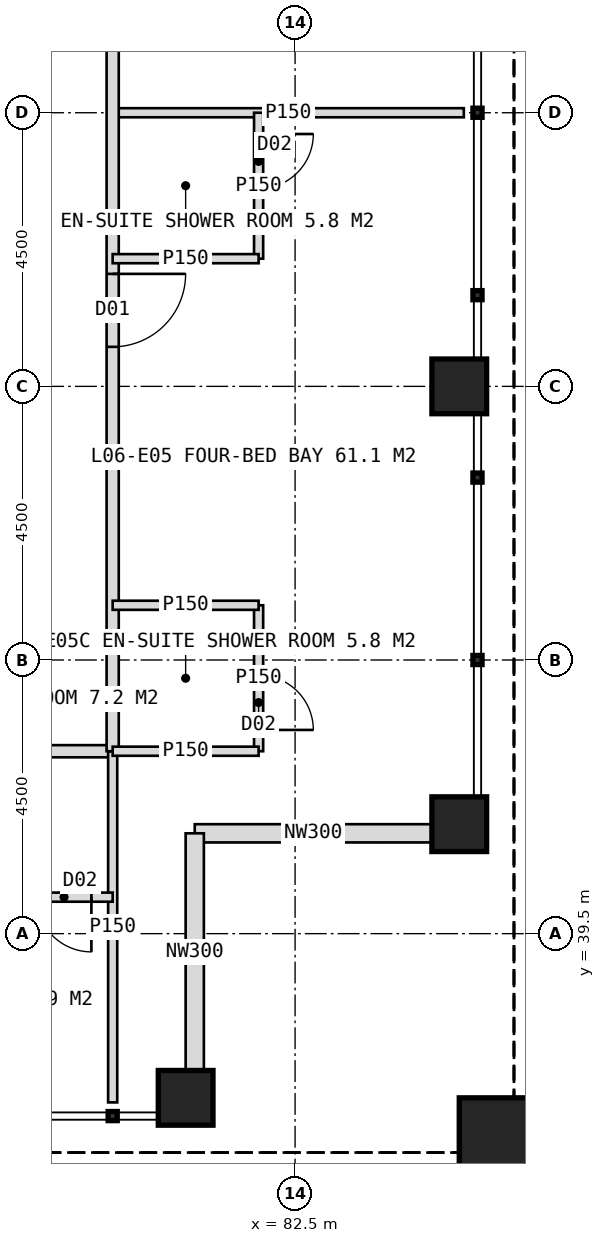
"""IFC4 building model, lengths in metres.
Left out: names, types, materials, properties, quantities, classifications, styles, units other than length and angle.
Written with IfcOpenShell. Run it as: python <this file> out.ifc"""

import sys

from ifc_helpers import new_model, si_unit, direction, frame, frame_2d, origin, origin_2d, place, context, subcontext, project, spatial, rectangle, hollow_rectangle, extrude, element, fill, save


model = new_model("IFC4")
c1 = context("Model", 3, precision=1e-05, world=origin(), true_north=direction((0.0, 1.0)))
c2 = subcontext(c1, "Body", "Model", "MODEL_VIEW")
j1 = project(units=[si_unit("LENGTHUNIT", "METRE"), si_unit("PLANEANGLEUNIT", "RADIAN")], contexts=[c1])
p1 = place(None, origin())
s1 = spatial("IfcSite", under=j1, at=p1, CompositionType="ELEMENT")
p2 = place(p1, origin())
s2 = spatial("IfcBuilding", under=s1, at=p2, CompositionType="ELEMENT")
p3 = place(p2, frame((0.0, 0.0, 31.0)))
s3 = spatial("IfcBuildingStorey", under=s2, at=p3, CompositionType="ELEMENT", Elevation=31.0)
for number, where, z_axis, x_axis in (
    (1, (85.2, 41.3, 0.0), (0.0, 0.0, 1.0), (1.0, 0.0, 0.0)),
    (2, (85.2, 48.5, 0.0), (0.0, 0.0, 1.0), (1.0, 0.0, 0.0)),
    (3, (80.7, 36.8, 0.0), (0.0, 0.0, 1.0), (1.0, 0.0, 0.0)),
):
    element("IfcColumn", number, at=place(p3, frame(where, z_axis=z_axis, x_axis=x_axis)), inside=s3, PredefinedType="COLUMN", context=c2, shape_type="SweptSolid", body=[
        extrude(hollow_rectangle(XDim=0.9, YDim=0.9, WallThickness=0.08, at=origin_2d()), origin(), (0.0, 0.0, 1.0), 4.0),
    ])
p4 = place(p3, frame((86.1, 35.9, 0.0), z_axis=(0.0, 0.0, 1.0), x_axis=(1.0, 0.0, 0.0)))
e4 = element("IfcColumn", 4, at=p4, inside=s3, PredefinedType="COLUMN", context=c2, shape_type="SweptSolid", body=[
    extrude(hollow_rectangle(XDim=1.8, YDim=1.8, WallThickness=0.1, at=origin_2d()), origin(), (0.0, 0.0, 1.0), 4.0),
])
for number, where, z_axis, x_axis in (
    (5, (84.75, 41.15, 0.0), (0.0, 0.0, 1.0), (-1.0, 0.0, 0.0)),
    (6, (80.85, 41.15, 0.0), (0.0, 0.0, 1.0), (0.0, -1.0, 0.0)),
):
    element("IfcWall", number, at=place(p3, frame(where, z_axis=z_axis, x_axis=x_axis)), inside=s3, PredefinedType="ELEMENTEDWALL", context=c2, shape_type="SweptSolid", body=[
        extrude(rectangle(XDim=3.9, YDim=0.3, at=frame_2d((1.95, 0.0))), origin(), (0.0, 0.0, 1.0), 2.95),
    ])
p5 = place(p3, frame((79.5, 42.5, 0.0), z_axis=(0.0, 0.0, 1.0), x_axis=(-1.0, 0.0, 0.0)))
e7 = element("IfcWall", 7, at=p5, inside=s3, PredefinedType="PARTITIONING", context=c2, shape_type="SweptSolid", body=[
    extrude(rectangle(XDim=39.0, YDim=0.2, at=frame_2d((19.5, 0.0))), origin(), (0.0, 0.0, 1.0), 3.75),
])
p6 = place(p5, frame((3.25, 0.0, 0.0)))
e8 = element("IfcOpeningElement", 8, at=p6, cuts=e7, PredefinedType="OPENING", context=c2, shape_type="SweptSolid", body=[
    extrude(rectangle(XDim=1.2, YDim=2.2, at=frame_2d((0.6, 1.1))), frame((0.0, 0.11, 0.0), z_axis=(0.0, -1.0, 0.0), x_axis=(1.0, 0.0, 0.0)), (0.0, 0.0, 1.0), 0.22),
])
p7 = place(p5, frame((10.15, 0.0, 0.0)))
e9 = element("IfcOpeningElement", 9, at=p7, cuts=e7, PredefinedType="OPENING", context=c2, shape_type="SweptSolid", body=[
    extrude(rectangle(XDim=1.2, YDim=2.2, at=frame_2d((0.6, 1.1))), frame((0.0, 0.11, 0.0), z_axis=(0.0, -1.0, 0.0), x_axis=(1.0, 0.0, 0.0)), (0.0, 0.0, 1.0), 0.22),
])
p8 = place(p5, frame((16.15, 0.0, 0.0)))
e10 = element("IfcOpeningElement", 10, at=p8, cuts=e7, PredefinedType="OPENING", context=c2, shape_type="SweptSolid", body=[
    extrude(rectangle(XDim=1.2, YDim=2.2, at=frame_2d((0.6, 1.1))), frame((0.0, 0.11, 0.0), z_axis=(0.0, -1.0, 0.0), x_axis=(1.0, 0.0, 0.0)), (0.0, 0.0, 1.0), 0.22),
])
p9 = place(p5, frame((22.75, 0.0, 0.0)))
e11 = element("IfcOpeningElement", 11, at=p9, cuts=e7, PredefinedType="OPENING", context=c2, shape_type="SweptSolid", body=[
    extrude(rectangle(XDim=1.2, YDim=2.2, at=frame_2d((0.6, 1.1))), frame((0.0, 0.11, 0.0), z_axis=(0.0, -1.0, 0.0), x_axis=(1.0, 0.0, 0.0)), (0.0, 0.0, 1.0), 0.22),
])
p10 = place(p5, frame((31.15, 0.0, 0.0)))
e12 = element("IfcOpeningElement", 12, at=p10, cuts=e7, PredefinedType="OPENING", context=c2, shape_type="SweptSolid", body=[
    extrude(rectangle(XDim=1.2, YDim=2.2, at=frame_2d((0.6, 1.1))), frame((0.0, 0.11, 0.0), z_axis=(0.0, -1.0, 0.0), x_axis=(1.0, 0.0, 0.0)), (0.0, 0.0, 1.0), 0.22),
])
p11 = place(p3, frame((79.5, 42.5, 0.0), z_axis=(0.0, 0.0, 1.0), x_axis=(0.0, -1.0, 0.0)))
e13 = element("IfcWall", 13, at=p11, inside=s3, PredefinedType="PARTITIONING", context=c2, shape_type="SweptSolid", body=[
    extrude(rectangle(XDim=5.775, YDim=0.15, at=frame_2d((2.887, 0.0))), origin(), (0.0, 0.0, 1.0), 3.75),
])
p12 = place(p3, frame((79.5, 40.1, 0.0), z_axis=(0.0, 0.0, 1.0), x_axis=(-1.0, 0.0, 0.0)))
e14 = element("IfcWall", 14, at=p12, inside=s3, PredefinedType="PARTITIONING", context=c2, shape_type="SweptSolid", body=[
    extrude(rectangle(XDim=3.0, YDim=0.15, at=frame_2d((1.5, 0.0))), origin(), (0.0, 0.0, 1.0), 3.75),
])
p13 = place(p12, frame((0.35, 0.0, 0.0)))
e15 = element("IfcOpeningElement", 15, at=p13, cuts=e14, PredefinedType="OPENING", context=c2, shape_type="SweptSolid", body=[
    extrude(rectangle(XDim=0.9, YDim=2.1, at=frame_2d((0.45, 1.05))), frame((0.0, 0.085, 0.0), z_axis=(0.0, -1.0, 0.0), x_axis=(1.0, 0.0, 0.0)), (0.0, 0.0, 1.0), 0.17),
])
p14 = place(p3, frame((79.5, 53.0, 0.0), z_axis=(0.0, 0.0, 1.0), x_axis=(1.0, 0.0, 0.0)))
e16 = element("IfcWall", 16, at=p14, inside=s3, PredefinedType="PARTITIONING", context=c2, shape_type="SweptSolid", body=[
    extrude(rectangle(XDim=5.775, YDim=0.15, at=frame_2d((2.887, 0.0))), origin(), (0.0, 0.0, 1.0), 3.75),
])
p15 = place(p3, frame((79.5, 81.5, 0.0), z_axis=(0.0, 0.0, 1.0), x_axis=(0.0, -1.0, 0.0)))
e17 = element("IfcWall", 17, at=p15, inside=s3, PredefinedType="PARTITIONING", context=c2, shape_type="SweptSolid", body=[
    extrude(rectangle(XDim=39.0, YDim=0.2, at=frame_2d((19.5, 0.0))), origin(), (0.0, 0.0, 1.0), 3.75),
])
p16 = place(p15, frame((3.25, 0.0, 0.0)))
e18 = element("IfcOpeningElement", 18, at=p16, cuts=e17, PredefinedType="OPENING", context=c2, shape_type="SweptSolid", body=[
    extrude(rectangle(XDim=1.2, YDim=2.2, at=frame_2d((0.6, 1.1))), frame((0.0, 0.11, 0.0), z_axis=(0.0, -1.0, 0.0), x_axis=(1.0, 0.0, 0.0)), (0.0, 0.0, 1.0), 0.22),
])
p17 = place(p15, frame((10.15, 0.0, 0.0)))
e19 = element("IfcOpeningElement", 19, at=p17, cuts=e17, PredefinedType="OPENING", context=c2, shape_type="SweptSolid", body=[
    extrude(rectangle(XDim=1.2, YDim=2.2, at=frame_2d((0.6, 1.1))), frame((0.0, 0.11, 0.0), z_axis=(0.0, -1.0, 0.0), x_axis=(1.0, 0.0, 0.0)), (0.0, 0.0, 1.0), 0.22),
])
p18 = place(p15, frame((16.15, 0.0, 0.0)))
e20 = element("IfcOpeningElement", 20, at=p18, cuts=e17, PredefinedType="OPENING", context=c2, shape_type="SweptSolid", body=[
    extrude(rectangle(XDim=1.2, YDim=2.2, at=frame_2d((0.6, 1.1))), frame((0.0, 0.11, 0.0), z_axis=(0.0, -1.0, 0.0), x_axis=(1.0, 0.0, 0.0)), (0.0, 0.0, 1.0), 0.22),
])
p19 = place(p15, frame((22.75, 0.0, 0.0)))
e21 = element("IfcOpeningElement", 21, at=p19, cuts=e17, PredefinedType="OPENING", context=c2, shape_type="SweptSolid", body=[
    extrude(rectangle(XDim=1.2, YDim=2.2, at=frame_2d((0.6, 1.1))), frame((0.0, 0.11, 0.0), z_axis=(0.0, -1.0, 0.0), x_axis=(1.0, 0.0, 0.0)), (0.0, 0.0, 1.0), 0.22),
])
p20 = place(p15, frame((31.15, 0.0, 0.0)))
e22 = element("IfcOpeningElement", 22, at=p20, cuts=e17, PredefinedType="OPENING", context=c2, shape_type="SweptSolid", body=[
    extrude(rectangle(XDim=1.2, YDim=2.2, at=frame_2d((0.6, 1.1))), frame((0.0, 0.11, 0.0), z_axis=(0.0, -1.0, 0.0), x_axis=(1.0, 0.0, 0.0)), (0.0, 0.0, 1.0), 0.22),
])
p21 = place(p3, frame((81.9, 53.0, 0.0), z_axis=(0.0, 0.0, 1.0), x_axis=(0.0, -1.0, 0.0)))
e23 = element("IfcWall", 23, at=p21, inside=s3, PredefinedType="PARTITIONING", context=c2, shape_type="SweptSolid", body=[
    extrude(rectangle(XDim=2.4, YDim=0.15, at=frame_2d((1.2, 0.0))), origin(), (0.0, 0.0, 1.0), 3.75),
])
p22 = place(p21, frame((0.35, 0.0, 0.0)))
e24 = element("IfcOpeningElement", 24, at=p22, cuts=e23, PredefinedType="OPENING", context=c2, shape_type="SweptSolid", body=[
    extrude(rectangle(XDim=0.9, YDim=2.1, at=frame_2d((0.45, 1.05))), frame((0.0, 0.085, 0.0), z_axis=(0.0, -1.0, 0.0), x_axis=(1.0, 0.0, 0.0)), (0.0, 0.0, 1.0), 0.17),
])
p23 = place(p3, frame((79.5, 50.6, 0.0), z_axis=(0.0, 0.0, 1.0), x_axis=(1.0, 0.0, 0.0)))
e25 = element("IfcWall", 25, at=p23, inside=s3, PredefinedType="PARTITIONING", context=c2, shape_type="SweptSolid", body=[
    extrude(rectangle(XDim=2.4, YDim=0.15, at=frame_2d((1.2, 0.0))), origin(), (0.0, 0.0, 1.0), 3.75),
])
p24 = place(p3, frame((81.9, 44.9, 0.0), z_axis=(0.0, 0.0, 1.0), x_axis=(0.0, -1.0, 0.0)))
e26 = element("IfcWall", 26, at=p24, inside=s3, PredefinedType="PARTITIONING", context=c2, shape_type="SweptSolid", body=[
    extrude(rectangle(XDim=2.4, YDim=0.15, at=frame_2d((1.2, 0.0))), origin(), (0.0, 0.0, 1.0), 3.75),
])
p25 = place(p24, frame((1.15, 0.0, 0.0)))
e27 = element("IfcOpeningElement", 27, at=p25, cuts=e26, PredefinedType="OPENING", context=c2, shape_type="SweptSolid", body=[
    extrude(rectangle(XDim=0.9, YDim=2.1, at=frame_2d((0.45, 1.05))), frame((0.0, 0.085, 0.0), z_axis=(0.0, -1.0, 0.0), x_axis=(1.0, 0.0, 0.0)), (0.0, 0.0, 1.0), 0.17),
])
for number, where, z_axis, x_axis in (
    (28, (79.5, 44.9, 0.0), (0.0, 0.0, 1.0), (1.0, 0.0, 0.0)),
    (29, (79.5, 42.5, 0.0), (0.0, 0.0, 1.0), (1.0, 0.0, 0.0)),
):
    element("IfcWall", number, at=place(p3, frame(where, z_axis=z_axis, x_axis=x_axis)), inside=s3, PredefinedType="PARTITIONING", context=c2, shape_type="SweptSolid", body=[
        extrude(rectangle(XDim=2.4, YDim=0.15, at=frame_2d((1.2, 0.0))), origin(), (0.0, 0.0, 1.0), 3.75),
    ])
p26 = place(p13, origin())
e30 = element("IfcDoor", 30, at=p26, inside=s3, OperationType="SINGLE_SWING_LEFT", PredefinedType="DOOR", context=c2, shape_type="SweptSolid", body=[
    extrude(rectangle(XDim=0.9, YDim=2.1, at=frame_2d((0.45, 1.05))), frame((0.0, 0.025, 0.0), z_axis=(0.0, -1.0, 0.0), x_axis=(1.0, 0.0, 0.0)), (0.0, 0.0, 1.0), 0.05),
])
fill(e15, e30)
p27 = place(p20, origin())
e31 = element("IfcDoor", 31, at=p27, inside=s3, OperationType="SINGLE_SWING_LEFT", PredefinedType="DOOR", context=c2, shape_type="SweptSolid", body=[
    extrude(rectangle(XDim=1.2, YDim=2.2, at=frame_2d((0.6, 1.1))), frame((0.0, 0.025, 0.0), z_axis=(0.0, -1.0, 0.0), x_axis=(1.0, 0.0, 0.0)), (0.0, 0.0, 1.0), 0.05),
])
fill(e22, e31)
p28 = place(p22, origin())
e32 = element("IfcDoor", 32, at=p28, inside=s3, OperationType="SINGLE_SWING_LEFT", PredefinedType="DOOR", context=c2, shape_type="SweptSolid", body=[
    extrude(rectangle(XDim=0.9, YDim=2.1, at=frame_2d((0.45, 1.05))), frame((0.0, 0.025, 0.0), z_axis=(0.0, -1.0, 0.0), x_axis=(1.0, 0.0, 0.0)), (0.0, 0.0, 1.0), 0.05),
])
fill(e24, e32)
p29 = place(p25, origin())
e33 = element("IfcDoor", 33, at=p29, inside=s3, OperationType="SINGLE_SWING_RIGHT", PredefinedType="DOOR", context=c2, shape_type="SweptSolid", body=[
    extrude(rectangle(XDim=0.9, YDim=2.1, at=frame_2d((0.45, 1.05))), frame((0.0, 0.025, 0.0), z_axis=(0.0, -1.0, 0.0), x_axis=(1.0, 0.0, 0.0)), (0.0, 0.0, 1.0), 0.05),
])
fill(e27, e33)
save(model, sys.argv[1])
